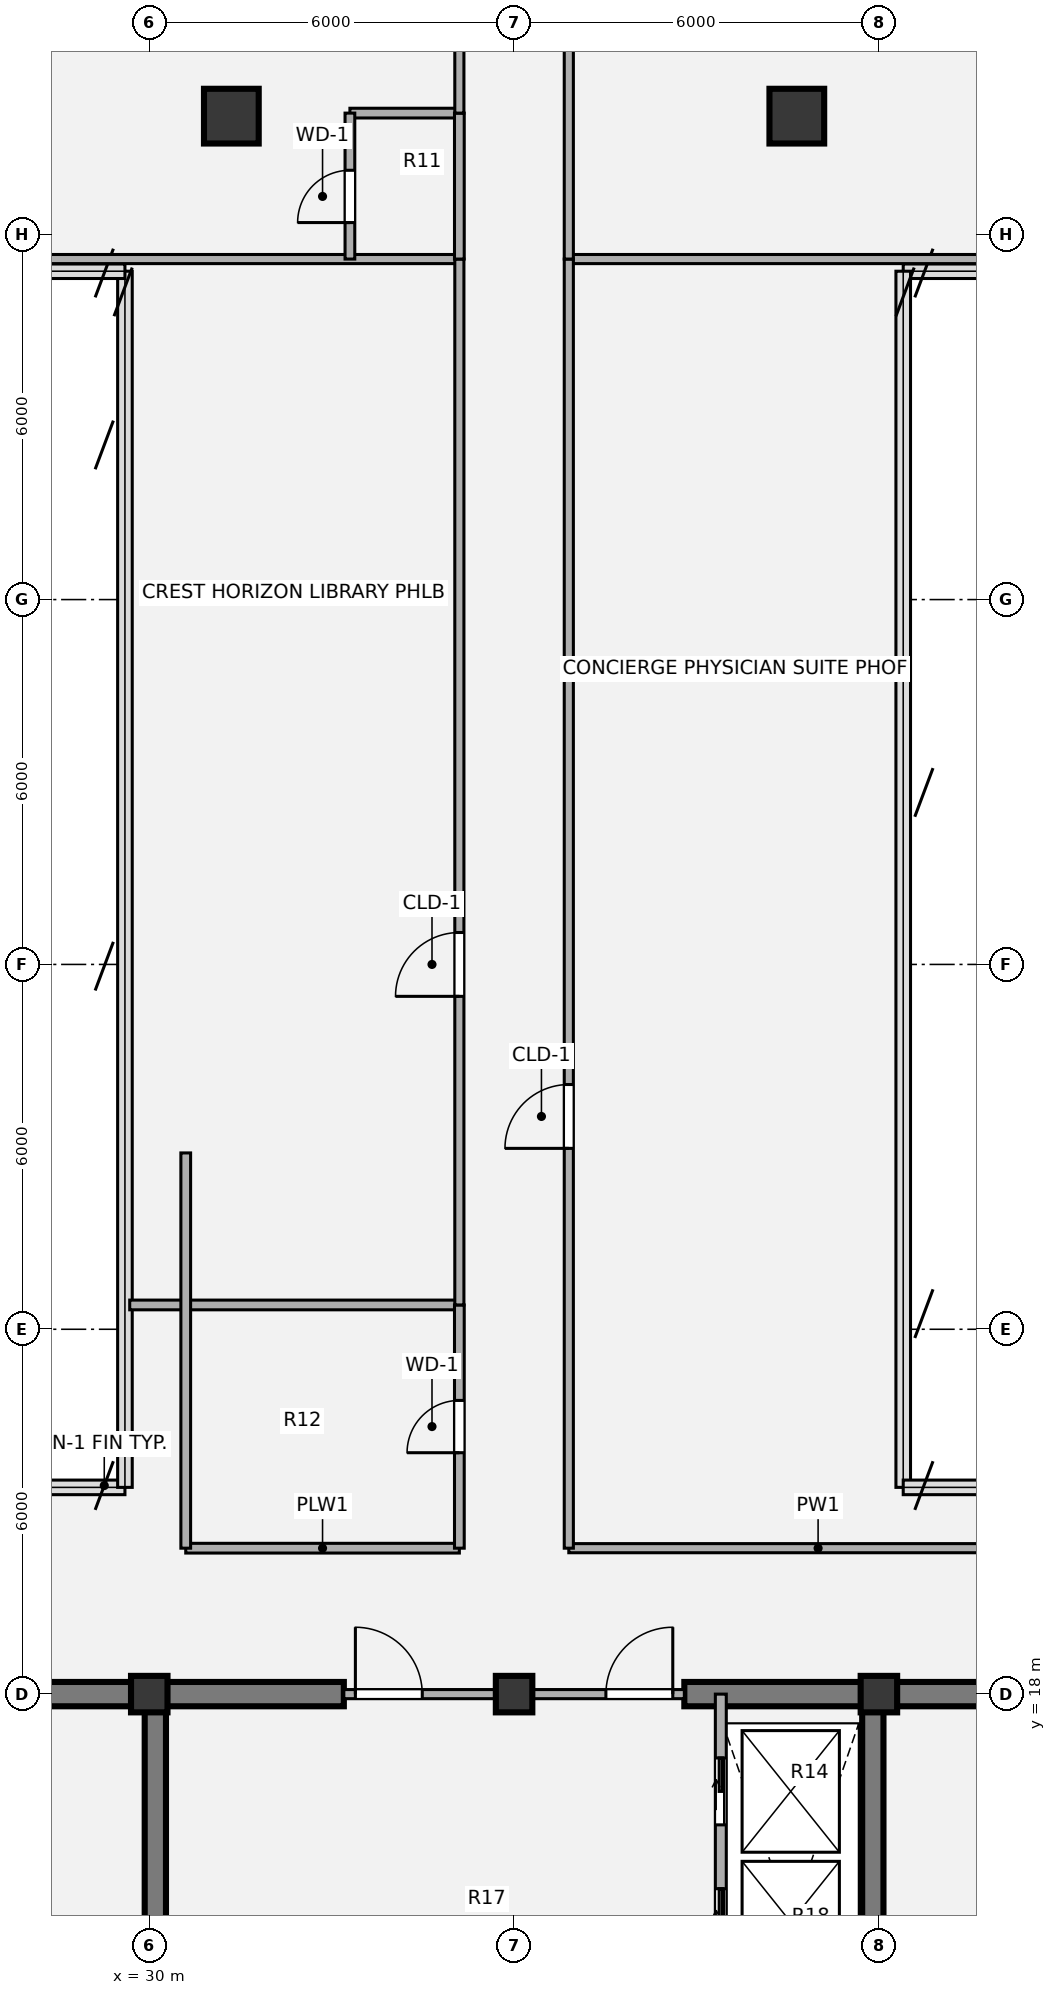
"""IFC4 building model, lengths in metres.
Left out: names, types, materials, properties, quantities, classifications, styles, units other than length and angle.
Written with IfcOpenShell. Run it as: python <this file> out.ifc"""

import sys

from ifc_helpers import new_model, si_unit, direction, frame, frame_2d, origin, origin_2d, place, context, subcontext, project, spatial, rectangle, hollow_circle, extrude, source, transform, mapped, element, fill, save


model = new_model("IFC4")
c1 = context("Model", 3, precision=1e-05, world=origin(), true_north=direction((0.0, 1.0)))
c2 = subcontext(c1, "Body", "Model", "MODEL_VIEW")
j1 = project(units=[si_unit("LENGTHUNIT", "METRE"), si_unit("PLANEANGLEUNIT", "RADIAN")], contexts=[c1])
p1 = place(None, origin())
s1 = spatial("IfcSite", under=j1, at=p1, CompositionType="ELEMENT")
p2 = place(p1, origin())
s2 = spatial("IfcBuilding", under=s1, at=p2, CompositionType="ELEMENT")
p3 = place(p2, frame((0.0, 0.0, 279.72)))
s3 = spatial("IfcBuildingStorey", under=s2, at=p3, CompositionType="ELEMENT", Elevation=279.72)
m1 = source(origin(), c2, "Body", "SweptSolid", [
    extrude(rectangle(XDim=0.6, YDim=0.6, at=origin_2d()), origin(), (0.0, 0.0, 1.0), 3.78),
])
for number, where, z_axis, x_axis in (
    (1, (30.0, 18.0, 0.0), (0.0, 0.0, 1.0), (1.0, 0.0, 0.0)),
    (2, (36.0, 18.0, 0.0), (0.0, 0.0, 1.0), (1.0, 0.0, 0.0)),
    (3, (42.0, 18.0, 0.0), (0.0, 0.0, 1.0), (1.0, 0.0, 0.0)),
):
    element("IfcColumn", number, at=place(p3, frame(where, z_axis=z_axis, x_axis=x_axis)), inside=s3, PredefinedType="COLUMN", context=c2, shape_type="MappedRepresentation", body=[
        mapped(m1, transform((0.0, 0.0, 0.0), x_axis=(1.0, 0.0, 0.0), y_axis=(0.0, 1.0, 0.0), z_axis=(0.0, 0.0, 1.0), scale=1.0)),
    ])
p4 = place(p3, frame((23.8, 18.0, 0.0), z_axis=(0.0, 0.0, 1.0), x_axis=(1.0, 0.0, 0.0)))
e4 = element("IfcWall", 4, at=p4, inside=s3, PredefinedType="SHEAR", context=c2, shape_type="SweptSolid", body=[
    extrude(rectangle(XDim=9.4, YDim=0.4, at=frame_2d((4.7, 0.0))), origin(), (0.0, 0.0, 1.0), 3.78),
])
p5 = place(p4, frame((2.95, 0.0, 0.0)))
e5 = element("IfcOpeningElement", 5, at=p5, cuts=e4, PredefinedType="OPENING", context=c2, shape_type="SweptSolid", body=[
    extrude(rectangle(XDim=1.1, YDim=2.1, at=origin_2d()), frame((0.55, 0.21, 1.05), z_axis=(0.0, -1.0, 0.0), x_axis=(1.0, 0.0, 0.0)), (0.0, 0.0, 1.0), 0.42),
])
p6 = place(p3, frame((38.8, 18.0, 0.0), z_axis=(0.0, 0.0, 1.0), x_axis=(1.0, 0.0, 0.0)))
e6 = element("IfcWall", 6, at=p6, inside=s3, PredefinedType="SHEAR", context=c2, shape_type="SweptSolid", body=[
    extrude(rectangle(XDim=9.4, YDim=0.4, at=frame_2d((4.7, 0.0))), origin(), (0.0, 0.0, 1.0), 3.78),
])
p7 = place(p6, frame((5.45, 0.0, 0.0)))
e7 = element("IfcOpeningElement", 7, at=p7, cuts=e6, PredefinedType="OPENING", context=c2, shape_type="SweptSolid", body=[
    extrude(rectangle(XDim=1.1, YDim=2.1, at=origin_2d()), frame((0.55, 0.21, 1.05), z_axis=(0.0, -1.0, 0.0), x_axis=(1.0, 0.0, 0.0)), (0.0, 0.0, 1.0), 0.42),
])
p8 = place(p3, frame((30.1, 6.0, 0.0), z_axis=(0.0, 0.0, 1.0), x_axis=(0.0, 1.0, 0.0)))
e8 = element("IfcWall", 8, at=p8, inside=s3, PredefinedType="SHEAR", context=c2, shape_type="SweptSolid", body=[
    extrude(rectangle(XDim=12.0, YDim=0.35, at=frame_2d((6.0, 0.0))), origin(), (0.0, 0.0, 1.0), 3.78),
])
p9 = place(p3, frame((41.9, 18.0, 0.0), z_axis=(0.0, 0.0, 1.0), x_axis=(0.0, -1.0, 0.0)))
e9 = element("IfcWall", 9, at=p9, inside=s3, PredefinedType="SHEAR", context=c2, shape_type="SweptSolid", body=[
    extrude(rectangle(XDim=12.0, YDim=0.35, at=frame_2d((6.0, 0.0))), origin(), (0.0, 0.0, 1.0), 3.78),
])
p10 = place(p9, frame((10.08, 0.0, 0.0)))
e10 = element("IfcOpeningElement", 10, at=p10, cuts=e9, PredefinedType="OPENING", context=c2, shape_type="SweptSolid", body=[
    extrude(rectangle(XDim=1.3, YDim=2.1, at=origin_2d()), frame((0.65, 0.185, 1.05), z_axis=(0.0, -1.0, 0.0), x_axis=(1.0, 0.0, 0.0)), (0.0, 0.0, 1.0), 0.37),
])
m2 = source(origin(), c2, "Body", "SweptSolid", [
    extrude(hollow_circle(Radius=0.45, WallThickness=0.032, at=origin_2d()), origin(), (0.0, 0.0, 1.0), 3.78),
])
for number, where, z_axis, x_axis in (
    (11, (31.35, 43.95, 0.0), (0.0, 0.0, 1.0), (1.0, 0.0, 0.0)),
    (12, (40.65, 43.95, 0.0), (0.0, 0.0, 1.0), (1.0, 0.0, 0.0)),
):
    element("IfcColumn", number, at=place(p3, frame(where, z_axis=z_axis, x_axis=x_axis)), inside=s3, PredefinedType="COLUMN", context=c2, shape_type="MappedRepresentation", body=[
        mapped(m2, transform((0.0, 0.0, 0.0), x_axis=(1.0, 0.0, 0.0), y_axis=(0.0, 1.0, 0.0), z_axis=(0.0, 0.0, 1.0), scale=1.0)),
    ])
p11 = place(p3, frame((33.2, 18.0, 0.0), z_axis=(0.0, 0.0, 1.0), x_axis=(1.0, 0.0, 0.0)))
e13 = element("IfcWall", 13, at=p11, inside=s3, PredefinedType="PARTITIONING", context=c2, shape_type="SweptSolid", body=[
    extrude(rectangle(XDim=5.6, YDim=0.15, at=frame_2d((2.8, 0.0))), origin(), (0.0, 0.0, 1.0), 2.515),
])
p12 = place(p11, frame((0.19, 0.0, 0.0)))
e14 = element("IfcOpeningElement", 14, at=p12, cuts=e13, PredefinedType="OPENING", context=c2, shape_type="SweptSolid", body=[
    extrude(rectangle(XDim=1.1, YDim=2.1, at=origin_2d()), frame((0.55, 0.085, 1.05), z_axis=(0.0, -1.0, 0.0), x_axis=(1.0, 0.0, 0.0)), (0.0, 0.0, 1.0), 0.17),
])
p13 = place(p11, frame((4.31, 0.0, 0.0)))
e15 = element("IfcOpeningElement", 15, at=p13, cuts=e13, PredefinedType="OPENING", context=c2, shape_type="SweptSolid", body=[
    extrude(rectangle(XDim=1.1, YDim=2.1, at=origin_2d()), frame((0.55, 0.085, 1.05), z_axis=(0.0, -1.0, 0.0), x_axis=(1.0, 0.0, 0.0)), (0.0, 0.0, 1.0), 0.17),
])
p14 = place(p3, frame((39.4, 11.0, 0.0), z_axis=(0.0, 0.0, 1.0), x_axis=(0.0, 1.0, 0.0)))
e16 = element("IfcWall", 16, at=p14, inside=s3, PredefinedType="PARTITIONING", context=c2, shape_type="SweptSolid", body=[
    extrude(rectangle(XDim=7.0, YDim=0.18, at=frame_2d((3.5, 0.0))), origin(), (0.0, 0.0, 1.0), 3.5),
])
p15 = place(p14, frame((0.55, 0.0, 0.0)))
e17 = element("IfcOpeningElement", 17, at=p15, cuts=e16, PredefinedType="OPENING", context=c2, shape_type="SweptSolid", body=[
    extrude(rectangle(XDim=1.1, YDim=2.1, at=origin_2d()), frame((0.55, 0.1, 1.05), z_axis=(0.0, -1.0, 0.0), x_axis=(1.0, 0.0, 0.0)), (0.0, 0.0, 1.0), 0.2),
])
p16 = place(p14, frame((2.7, 0.0, 0.0)))
e18 = element("IfcOpeningElement", 18, at=p16, cuts=e16, PredefinedType="OPENING", context=c2, shape_type="SweptSolid", body=[
    extrude(rectangle(XDim=1.1, YDim=2.1, at=origin_2d()), frame((0.55, 0.1, 1.05), z_axis=(0.0, -1.0, 0.0), x_axis=(1.0, 0.0, 0.0)), (0.0, 0.0, 1.0), 0.2),
])
p17 = place(p14, frame((4.85, 0.0, 0.0)))
e19 = element("IfcOpeningElement", 19, at=p17, cuts=e16, PredefinedType="OPENING", context=c2, shape_type="SweptSolid", body=[
    extrude(rectangle(XDim=1.1, YDim=2.1, at=origin_2d()), frame((0.55, 0.1, 1.05), z_axis=(0.0, -1.0, 0.0), x_axis=(1.0, 0.0, 0.0)), (0.0, 0.0, 1.0), 0.2),
])
p18 = place(p3, frame((30.6, 20.4, 0.0), z_axis=(0.0, 0.0, 1.0), x_axis=(1.0, 0.0, 0.0)))
e20 = element("IfcWall", 20, at=p18, inside=s3, PredefinedType="PLUMBINGWALL", context=c2, shape_type="SweptSolid", body=[
    extrude(rectangle(XDim=4.5, YDim=0.16, at=frame_2d((2.25, 0.0))), origin(), (0.0, 0.0, 1.0), 3.5),
])
p19 = place(p3, frame((36.9, 20.4, 0.0), z_axis=(0.0, 0.0, 1.0), x_axis=(1.0, 0.0, 0.0)))
e21 = element("IfcWall", 21, at=p19, inside=s3, PredefinedType="PARTITIONING", context=c2, shape_type="SweptSolid", body=[
    extrude(rectangle(XDim=8.2, YDim=0.15, at=frame_2d((4.1, 0.0))), origin(), (0.0, 0.0, 1.0), 3.5),
])
p20 = place(p3, frame((29.679, 24.4, 0.0), z_axis=(0.0, 0.0, 1.0), x_axis=(1.0, 0.0, 0.0)))
e22 = element("IfcWall", 22, at=p20, inside=s3, PredefinedType="PLUMBINGWALL", context=c2, shape_type="SweptSolid", body=[
    extrude(rectangle(XDim=5.421, YDim=0.16, at=frame_2d((2.711, 0.0))), origin(), (0.0, 0.0, 1.0), 3.5),
])
p21 = place(p3, frame((27.558, 41.6, 0.0), z_axis=(0.0, 0.0, 1.0), x_axis=(1.0, 0.0, 0.0)))
e23 = element("IfcWall", 23, at=p21, inside=s3, PredefinedType="PARTITIONING", context=c2, shape_type="SweptSolid", body=[
    extrude(rectangle(XDim=7.542, YDim=0.15, at=frame_2d((3.771, 0.0))), origin(), (0.0, 0.0, 1.0), 3.5),
])
p22 = place(p3, frame((36.9, 41.6, 0.0), z_axis=(0.0, 0.0, 1.0), x_axis=(1.0, 0.0, 0.0)))
e24 = element("IfcWall", 24, at=p22, inside=s3, PredefinedType="PARTITIONING", context=c2, shape_type="SweptSolid", body=[
    extrude(rectangle(XDim=7.543, YDim=0.15, at=frame_2d((3.772, 0.0))), origin(), (0.0, 0.0, 1.0), 3.5),
])
p23 = place(p3, frame((33.3, 44.0, 0.0), z_axis=(0.0, 0.0, 1.0), x_axis=(1.0, 0.0, 0.0)))
e25 = element("IfcWall", 25, at=p23, inside=s3, PredefinedType="PLUMBINGWALL", context=c2, shape_type="SweptSolid", body=[
    extrude(rectangle(XDim=1.8, YDim=0.16, at=frame_2d((0.9, 0.0))), origin(), (0.0, 0.0, 1.0), 2.903),
])
p24 = place(p3, frame((30.6, 20.4, 0.0), z_axis=(0.0, 0.0, 1.0), x_axis=(0.0, 1.0, 0.0)))
e26 = element("IfcWall", 26, at=p24, inside=s3, PredefinedType="PLUMBINGWALL", context=c2, shape_type="SweptSolid", body=[
    extrude(rectangle(XDim=6.5, YDim=0.16, at=frame_2d((3.25, 0.0))), origin(), (0.0, 0.0, 1.0), 2.815),
])
p25 = place(p3, frame((33.3, 41.6, 0.0), z_axis=(0.0, 0.0, 1.0), x_axis=(0.0, 1.0, 0.0)))
e27 = element("IfcWall", 27, at=p25, inside=s3, PredefinedType="PLUMBINGWALL", context=c2, shape_type="SweptSolid", body=[
    extrude(rectangle(XDim=2.4, YDim=0.16, at=frame_2d((1.2, 0.0))), origin(), (0.0, 0.0, 1.0), 3.5),
])
p26 = place(p25, frame((0.6, 0.0, 0.0)))
e28 = element("IfcOpeningElement", 28, at=p26, cuts=e27, PredefinedType="OPENING", context=c2, shape_type="SweptSolid", body=[
    extrude(rectangle(XDim=0.86, YDim=2.1, at=origin_2d()), frame((0.43, 0.09, 1.05), z_axis=(0.0, -1.0, 0.0), x_axis=(1.0, 0.0, 0.0)), (0.0, 0.0, 1.0), 0.18),
])
p27 = place(p3, frame((35.1, 20.4, 0.0), z_axis=(0.0, 0.0, 1.0), x_axis=(0.0, 1.0, 0.0)))
e29 = element("IfcWall", 29, at=p27, inside=s3, PredefinedType="PLUMBINGWALL", context=c2, shape_type="SweptSolid", body=[
    extrude(rectangle(XDim=4.0, YDim=0.16, at=frame_2d((2.0, 0.0))), origin(), (0.0, 0.0, 1.0), 3.5),
])
p28 = place(p27, frame((1.57, 0.0, 0.0)))
e30 = element("IfcOpeningElement", 30, at=p28, cuts=e29, PredefinedType="OPENING", context=c2, shape_type="SweptSolid", body=[
    extrude(rectangle(XDim=0.86, YDim=2.1, at=origin_2d()), frame((0.43, 0.09, 1.05), z_axis=(0.0, -1.0, 0.0), x_axis=(1.0, 0.0, 0.0)), (0.0, 0.0, 1.0), 0.18),
])
p29 = place(p3, frame((35.1, 24.4, 0.0), z_axis=(0.0, 0.0, 1.0), x_axis=(0.0, 1.0, 0.0)))
e31 = element("IfcWall", 31, at=p29, inside=s3, PredefinedType="PARTITIONING", context=c2, shape_type="SweptSolid", body=[
    extrude(rectangle(XDim=17.2, YDim=0.15, at=frame_2d((8.6, 0.0))), origin(), (0.0, 0.0, 1.0), 3.5),
])
p30 = place(p29, frame((5.075, 0.0, 0.0)))
e32 = element("IfcOpeningElement", 32, at=p30, cuts=e31, PredefinedType="OPENING", context=c2, shape_type="SweptSolid", body=[
    extrude(rectangle(XDim=1.05, YDim=2.1, at=origin_2d()), frame((0.525, 0.085, 1.05), z_axis=(0.0, -1.0, 0.0), x_axis=(1.0, 0.0, 0.0)), (0.0, 0.0, 1.0), 0.17),
])
p31 = place(p3, frame((35.1, 41.6, 0.0), z_axis=(0.0, 0.0, 1.0), x_axis=(0.0, 1.0, 0.0)))
e33 = element("IfcWall", 33, at=p31, inside=s3, PredefinedType="PLUMBINGWALL", context=c2, shape_type="SweptSolid", body=[
    extrude(rectangle(XDim=2.4, YDim=0.16, at=frame_2d((1.2, 0.0))), origin(), (0.0, 0.0, 1.0), 3.5),
])
p32 = place(p3, frame((35.1, 44.0, 0.0), z_axis=(0.0, 0.0, 1.0), x_axis=(0.0, 1.0, 0.0)))
e34 = element("IfcWall", 34, at=p32, inside=s3, PredefinedType="PARTITIONING", context=c2, shape_type="SweptSolid", body=[
    extrude(rectangle(XDim=3.9, YDim=0.15, at=frame_2d((1.95, 0.0))), origin(), (0.0, 0.0, 1.0), 3.5),
])
p33 = place(p32, frame((1.49, 0.0, 0.0)))
e35 = element("IfcOpeningElement", 35, at=p33, cuts=e34, PredefinedType="OPENING", context=c2, shape_type="SweptSolid", body=[
    extrude(rectangle(XDim=0.92, YDim=2.1, at=origin_2d()), frame((0.46, 0.085, 1.05), z_axis=(0.0, -1.0, 0.0), x_axis=(1.0, 0.0, 0.0)), (0.0, 0.0, 1.0), 0.17),
])
p34 = place(p3, frame((36.9, 20.4, 0.0), z_axis=(0.0, 0.0, 1.0), x_axis=(0.0, 1.0, 0.0)))
e36 = element("IfcWall", 36, at=p34, inside=s3, PredefinedType="PARTITIONING", context=c2, shape_type="SweptSolid", body=[
    extrude(rectangle(XDim=21.2, YDim=0.15, at=frame_2d((10.6, 0.0))), origin(), (0.0, 0.0, 1.0), 3.5),
])
p35 = place(p34, frame((6.575, 0.0, 0.0)))
e37 = element("IfcOpeningElement", 37, at=p35, cuts=e36, PredefinedType="OPENING", context=c2, shape_type="SweptSolid", body=[
    extrude(rectangle(XDim=1.05, YDim=2.1, at=origin_2d()), frame((0.525, 0.085, 1.05), z_axis=(0.0, -1.0, 0.0), x_axis=(1.0, 0.0, 0.0)), (0.0, 0.0, 1.0), 0.17),
])
p36 = place(p3, frame((36.9, 41.6, 0.0), z_axis=(0.0, 0.0, 1.0), x_axis=(0.0, 1.0, 0.0)))
e38 = element("IfcWall", 38, at=p36, inside=s3, PredefinedType="PARTITIONING", context=c2, shape_type="SweptSolid", body=[
    extrude(rectangle(XDim=10.1, YDim=0.15, at=frame_2d((5.05, 0.0))), origin(), (0.0, 0.0, 1.0), 3.5),
])
p37 = place(p36, frame((4.725, 0.0, 0.0)))
e39 = element("IfcOpeningElement", 39, at=p37, cuts=e38, PredefinedType="OPENING", context=c2, shape_type="SweptSolid", body=[
    extrude(rectangle(XDim=1.05, YDim=2.1, at=origin_2d()), frame((0.525, 0.085, 1.05), z_axis=(0.0, -1.0, 0.0), x_axis=(1.0, 0.0, 0.0)), (0.0, 0.0, 1.0), 0.17),
])
m3 = source(origin(), c2, "Body", "SweptSolid", [
    extrude(rectangle(XDim=1.1, YDim=2.1, at=origin_2d()), frame((0.55, 0.025, 1.05), z_axis=(0.0, -1.0, 0.0), x_axis=(1.0, 0.0, 0.0)), (0.0, 0.0, 1.0), 0.05),
])
p38 = place(p12, origin())
e40 = element("IfcDoor", 40, at=p38, inside=s3, OperationType="SINGLE_SWING_LEFT", PredefinedType="DOOR", context=c2, shape_type="MappedRepresentation", body=[
    mapped(m3, transform((0.0, 0.0, 0.0), x_axis=(1.0, 0.0, 0.0), y_axis=(0.0, 1.0, 0.0), z_axis=(0.0, 0.0, 1.0), scale=1.0)),
])
fill(e14, e40)
p39 = place(p13, origin())
e41 = element("IfcDoor", 41, at=p39, inside=s3, OperationType="SINGLE_SWING_RIGHT", PredefinedType="DOOR", context=c2, shape_type="MappedRepresentation", body=[
    mapped(m3, transform((0.0, 0.0, 0.0), x_axis=(1.0, 0.0, 0.0), y_axis=(0.0, 1.0, 0.0), z_axis=(0.0, 0.0, 1.0), scale=1.0)),
])
fill(e15, e41)
m4 = source(origin(), c2, "Body", "SweptSolid", [
    extrude(rectangle(XDim=1.1, YDim=2.1, at=origin_2d()), frame((0.55, 0.025, 1.05), z_axis=(0.0, -1.0, 0.0), x_axis=(1.0, 0.0, 0.0)), (0.0, 0.0, 1.0), 0.05),
])
p40 = place(p16, origin())
e42 = element("IfcDoor", 42, at=p40, inside=s3, OperationType="SLIDING_TO_RIGHT", PredefinedType="DOOR", context=c2, shape_type="MappedRepresentation", body=[
    mapped(m4, transform((0.0, 0.0, 0.0), x_axis=(1.0, 0.0, 0.0), y_axis=(0.0, 1.0, 0.0), z_axis=(0.0, 0.0, 1.0), scale=1.0)),
])
fill(e18, e42)
p41 = place(p17, origin())
e43 = element("IfcDoor", 43, at=p41, inside=s3, OperationType="SLIDING_TO_RIGHT", PredefinedType="DOOR", context=c2, shape_type="MappedRepresentation", body=[
    mapped(m4, transform((0.0, 0.0, 0.0), x_axis=(1.0, 0.0, 0.0), y_axis=(0.0, 1.0, 0.0), z_axis=(0.0, 0.0, 1.0), scale=1.0)),
])
fill(e19, e43)
m5 = source(origin(), c2, "Body", "SweptSolid", [
    extrude(rectangle(XDim=0.86, YDim=2.1, at=origin_2d()), frame((0.43, 0.025, 1.05), z_axis=(0.0, -1.0, 0.0), x_axis=(1.0, 0.0, 0.0)), (0.0, 0.0, 1.0), 0.05),
])
p42 = place(p26, origin())
e44 = element("IfcDoor", 44, at=p42, inside=s3, OperationType="SINGLE_SWING_LEFT", PredefinedType="DOOR", context=c2, shape_type="MappedRepresentation", body=[
    mapped(m5, transform((0.0, 0.0, 0.0), x_axis=(1.0, 0.0, 0.0), y_axis=(0.0, 1.0, 0.0), z_axis=(0.0, 0.0, 1.0), scale=1.0)),
])
fill(e28, e44)
p43 = place(p28, origin())
e45 = element("IfcDoor", 45, at=p43, inside=s3, OperationType="SINGLE_SWING_LEFT", PredefinedType="DOOR", context=c2, shape_type="MappedRepresentation", body=[
    mapped(m5, transform((0.0, 0.0, 0.0), x_axis=(1.0, 0.0, 0.0), y_axis=(0.0, 1.0, 0.0), z_axis=(0.0, 0.0, 1.0), scale=1.0)),
])
fill(e30, e45)
m6 = source(origin(), c2, "Body", "SweptSolid", [
    extrude(rectangle(XDim=1.05, YDim=2.1, at=origin_2d()), frame((0.525, 0.025, 1.05), z_axis=(0.0, -1.0, 0.0), x_axis=(1.0, 0.0, 0.0)), (0.0, 0.0, 1.0), 0.05),
])
p44 = place(p30, origin())
e46 = element("IfcDoor", 46, at=p44, inside=s3, OperationType="SINGLE_SWING_LEFT", PredefinedType="DOOR", context=c2, shape_type="MappedRepresentation", body=[
    mapped(m6, transform((0.0, 0.0, 0.0), x_axis=(1.0, 0.0, 0.0), y_axis=(0.0, 1.0, 0.0), z_axis=(0.0, 0.0, 1.0), scale=1.0)),
])
fill(e32, e46)
p45 = place(p35, origin())
e47 = element("IfcDoor", 47, at=p45, inside=s3, OperationType="SINGLE_SWING_LEFT", PredefinedType="DOOR", context=c2, shape_type="MappedRepresentation", body=[
    mapped(m6, transform((0.0, 0.0, 0.0), x_axis=(1.0, 0.0, 0.0), y_axis=(0.0, 1.0, 0.0), z_axis=(0.0, 0.0, 1.0), scale=1.0)),
])
fill(e37, e47)
save(model, sys.argv[1])
